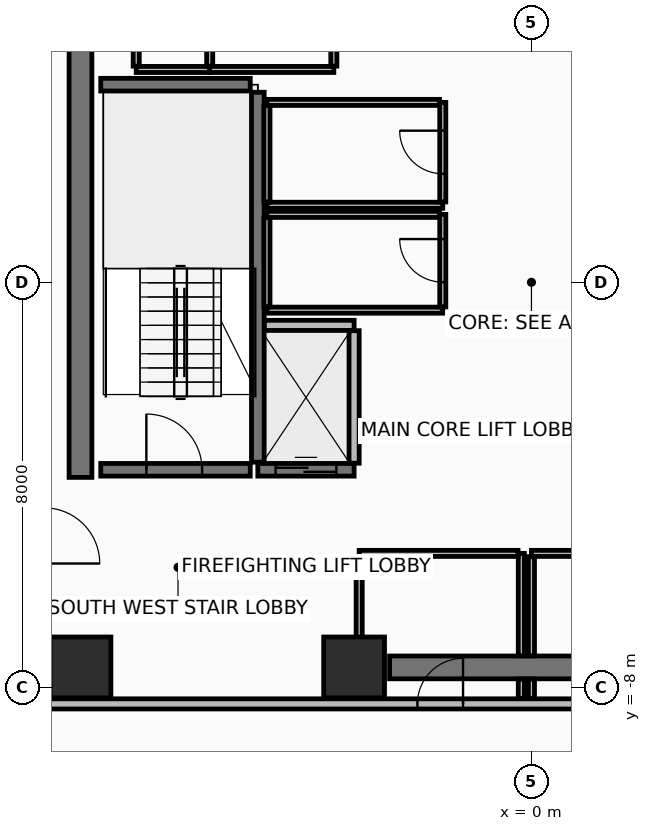
"""IFC4 building model, lengths in metres.
Left out: names, types, materials, properties, quantities, classifications, styles, units other than length and angle.
Written with IfcOpenShell. Run it as: python <this file> out.ifc"""

import sys

from ifc_helpers import new_model, si_unit, direction, frame, frame_2d, origin, origin_2d, place, context, subcontext, project, spatial, rectangle, extrude, element, fill, save


model = new_model("IFC4")
c1 = context("Model", 3, precision=1e-05, world=origin(), true_north=direction((0.0, 1.0)))
c2 = subcontext(c1, "Body", "Model", "MODEL_VIEW")
j1 = project(units=[si_unit("LENGTHUNIT", "METRE"), si_unit("PLANEANGLEUNIT", "RADIAN")], contexts=[c1])
p1 = place(None, origin())
s1 = spatial("IfcSite", under=j1, at=p1, CompositionType="ELEMENT")
p2 = place(p1, origin())
s2 = spatial("IfcBuilding", under=s1, at=p2, CompositionType="ELEMENT")
p3 = place(p2, frame((0.0, 0.0, 156.8)))
s3 = spatial("IfcBuildingStorey", under=s2, at=p3, CompositionType="ELEMENT", Elevation=156.8)
for number, where, z_axis, x_axis in (
    (1, (-8.9, -7.6, 0.0), (0.0, 0.0, 1.0), (1.0, 0.0, 0.0)),
    (2, (-3.5, -7.6, 0.0), (0.0, 0.0, 1.0), (1.0, 0.0, 0.0)),
):
    element("IfcColumn", number, at=place(p3, frame(where, z_axis=z_axis, x_axis=x_axis)), inside=s3, PredefinedType="COLUMN", context=c2, shape_type="SweptSolid", body=[
        extrude(rectangle(XDim=1.2, YDim=1.2, at=origin_2d()), origin(), (0.0, 0.0, 1.0), 3.6),
    ])
p4 = place(p3, frame((-2.8, -7.6, 0.0), z_axis=(0.0, 0.0, 1.0), x_axis=(1.0, 0.0, 0.0)))
e3 = element("IfcWall", 3, at=p4, inside=s3, PredefinedType="SHEAR", context=c2, shape_type="SweptSolid", body=[
    extrude(rectangle(XDim=5.38, YDim=0.45, at=frame_2d((2.69, 0.0))), origin(), (0.0, 0.0, 1.0), 3.41),
])
p5 = place(p3, frame((-8.9, -3.85, 0.0), z_axis=(0.0, 0.0, 1.0), x_axis=(0.0, 1.0, 0.0)))
e4 = element("IfcWall", 4, at=p5, inside=s3, PredefinedType="SHEAR", context=c2, shape_type="SweptSolid", body=[
    extrude(rectangle(XDim=10.7, YDim=0.45, at=frame_2d((5.35, 0.0))), origin(), (0.0, 0.0, 1.0), 3.41),
])
p6 = place(p3, frame((-9.62, -8.32, 0.0), z_axis=(0.0, 0.0, 1.0), x_axis=(1.0, 0.0, 0.0)))
e5 = element("IfcWall", 5, at=p6, inside=s3, PredefinedType="PARTITIONING", context=c2, shape_type="SweptSolid", body=[
    extrude(rectangle(XDim=19.24, YDim=0.2, at=frame_2d((9.62, 0.0))), origin(), (0.0, 0.0, 1.0), 2.855),
])
p7 = place(p6, frame((7.37, 0.0, 0.0)))
e6 = element("IfcOpeningElement", 6, at=p7, cuts=e5, PredefinedType="OPENING", context=c2, shape_type="SweptSolid", body=[
    extrude(rectangle(XDim=0.9, YDim=2.1, at=frame_2d((0.45, 1.05))), frame((0.0, 0.11, 0.0), z_axis=(0.0, -1.0, 0.0), x_axis=(1.0, 0.0, 0.0)), (0.0, 0.0, 1.0), 0.22),
])
p8 = place(p6, frame((10.77, 0.0, 0.0)))
e7 = element("IfcOpeningElement", 7, at=p8, cuts=e5, PredefinedType="OPENING", context=c2, shape_type="SweptSolid", body=[
    extrude(rectangle(XDim=0.9, YDim=2.1, at=frame_2d((0.45, 1.05))), frame((0.0, 0.11, 0.0), z_axis=(0.0, -1.0, 0.0), x_axis=(1.0, 0.0, 0.0)), (0.0, 0.0, 1.0), 0.22),
])
p9 = place(p6, frame((13.97, 0.0, 0.0)))
e8 = element("IfcOpeningElement", 8, at=p9, cuts=e5, PredefinedType="OPENING", context=c2, shape_type="SweptSolid", body=[
    extrude(rectangle(XDim=0.9, YDim=2.1, at=frame_2d((0.45, 1.05))), frame((0.0, 0.11, 0.0), z_axis=(0.0, -1.0, 0.0), x_axis=(1.0, 0.0, 0.0)), (0.0, 0.0, 1.0), 0.22),
])
p10 = place(p3, frame((-5.4, -3.55, 0.0), z_axis=(0.0, 0.0, 1.0), x_axis=(0.0, 1.0, 0.0)))
e9 = element("IfcWall", 9, at=p10, inside=s3, PredefinedType="SHEAR", context=c2, shape_type="SweptSolid", body=[
    extrude(rectangle(XDim=7.3, YDim=0.25, at=frame_2d((3.65, 0.0))), origin(), (0.0, 0.0, 1.0), 3.41),
])
p11 = place(p3, frame((-8.5, -3.7, 0.0), z_axis=(0.0, 0.0, 1.0), x_axis=(1.0, 0.0, 0.0)))
e10 = element("IfcWall", 10, at=p11, inside=s3, PredefinedType="SHEAR", context=c2, shape_type="SweptSolid", body=[
    extrude(rectangle(XDim=2.95, YDim=0.25, at=frame_2d((1.475, 0.0))), origin(), (0.0, 0.0, 1.0), 3.41),
])
p12 = place(p11, frame((0.9, 0.0, 0.0)))
e11 = element("IfcOpeningElement", 11, at=p12, cuts=e10, PredefinedType="OPENING", context=c2, shape_type="SweptSolid", body=[
    extrude(rectangle(XDim=1.1, YDim=2.15, at=frame_2d((0.55, 1.075))), frame((0.0, 0.135, 0.0), z_axis=(0.0, -1.0, 0.0), x_axis=(1.0, 0.0, 0.0)), (0.0, 0.0, 1.0), 0.27),
])
p13 = place(p3, frame((-8.5, 3.9, 0.0), z_axis=(0.0, 0.0, 1.0), x_axis=(1.0, 0.0, 0.0)))
e12 = element("IfcWall", 12, at=p13, inside=s3, PredefinedType="SHEAR", context=c2, shape_type="SweptSolid", body=[
    extrude(rectangle(XDim=2.95, YDim=0.25, at=frame_2d((1.475, 0.0))), origin(), (0.0, 0.0, 1.0), 3.41),
])
p14 = place(p3, frame((-5.4, -3.7, 0.0), z_axis=(0.0, 0.0, 1.0), x_axis=(1.0, 0.0, 0.0)))
e13 = element("IfcWall", 13, at=p14, inside=s3, PredefinedType="SHEAR", context=c2, shape_type="SweptSolid", body=[
    extrude(rectangle(XDim=1.9, YDim=0.25, at=frame_2d((0.95, 0.0))), origin(), (0.0, 0.0, 1.0), 3.41),
])
p15 = place(p14, frame((0.35, 0.0, 0.0)))
e14 = element("IfcOpeningElement", 14, at=p15, cuts=e13, PredefinedType="OPENING", context=c2, shape_type="SweptSolid", body=[
    extrude(rectangle(XDim=1.2, YDim=2.2, at=frame_2d((0.6, 1.1))), frame((0.0, 0.135, 0.0), z_axis=(0.0, -1.0, 0.0), x_axis=(1.0, 0.0, 0.0)), (0.0, 0.0, 1.0), 0.27),
])
p16 = place(p3, frame((-5.27, -0.85, 0.0), z_axis=(0.0, 0.0, 1.0), x_axis=(1.0, 0.0, 0.0)))
e15 = element("IfcWall", 15, at=p16, inside=s3, PredefinedType="PARTITIONING", context=c2, shape_type="SweptSolid", body=[
    extrude(rectangle(XDim=1.77, YDim=0.2, at=frame_2d((0.885, 0.0))), origin(), (0.0, 0.0, 1.0), 3.41),
])
p17 = place(p3, frame((-3.5, -3.57, 0.0), z_axis=(0.0, 0.0, 1.0), x_axis=(0.0, 1.0, 0.0)))
e16 = element("IfcWall", 16, at=p17, inside=s3, PredefinedType="PARTITIONING", context=c2, shape_type="SweptSolid", body=[
    extrude(rectangle(XDim=2.615, YDim=0.2, at=frame_2d((1.308, 0.0))), origin(), (0.0, 0.0, 1.0), 3.41),
])
p18 = place(p3, frame((-5.22, 1.52, 0.0), z_axis=(0.0, 0.0, 1.0), x_axis=(1.0, 0.0, 0.0)))
e17 = element("IfcWall", 17, at=p18, inside=s3, PredefinedType="PARTITIONING", context=c2, shape_type="SweptSolid", body=[
    extrude(rectangle(XDim=3.47, YDim=0.12, at=frame_2d((1.735, 0.0))), origin(), (0.0, 0.0, 1.0), 3.41),
])
p19 = place(p3, frame((-1.75, 1.585, 0.0), z_axis=(0.0, 0.0, 1.0), x_axis=(0.0, 1.0, 0.0)))
e18 = element("IfcWall", 18, at=p19, inside=s3, PredefinedType="PARTITIONING", context=c2, shape_type="SweptSolid", body=[
    extrude(rectangle(XDim=1.965, YDim=0.12, at=frame_2d((0.982, 0.0))), origin(), (0.0, 0.0, 1.0), 3.41),
])
p20 = place(p19, frame((0.557, 0.0, 0.0)))
e19 = element("IfcOpeningElement", 19, at=p20, cuts=e18, PredefinedType="OPENING", context=c2, shape_type="SweptSolid", body=[
    extrude(rectangle(XDim=0.85, YDim=2.1, at=frame_2d((0.425, 1.05))), frame((0.0, 0.07, 0.0), z_axis=(0.0, -1.0, 0.0), x_axis=(1.0, 0.0, 0.0)), (0.0, 0.0, 1.0), 0.14),
])
p21 = place(p3, frame((-1.815, 3.55, 0.0), z_axis=(0.0, 0.0, 1.0), x_axis=(-1.0, 0.0, 0.0)))
e20 = element("IfcWall", 20, at=p21, inside=s3, PredefinedType="PARTITIONING", context=c2, shape_type="SweptSolid", body=[
    extrude(rectangle(XDim=3.405, YDim=0.12, at=frame_2d((1.703, 0.0))), origin(), (0.0, 0.0, 1.0), 3.41),
])
p22 = place(p3, frame((-5.22, 3.485, 0.0), z_axis=(0.0, 0.0, 1.0), x_axis=(0.0, -1.0, 0.0)))
e21 = element("IfcWall", 21, at=p22, inside=s3, PredefinedType="PARTITIONING", context=c2, shape_type="SweptSolid", body=[
    extrude(rectangle(XDim=1.9, YDim=0.12, at=frame_2d((0.95, 0.0))), origin(), (0.0, 0.0, 1.0), 3.41),
])
p23 = place(p3, frame((-5.22, -0.55, 0.0), z_axis=(0.0, 0.0, 1.0), x_axis=(1.0, 0.0, 0.0)))
e22 = element("IfcWall", 22, at=p23, inside=s3, PredefinedType="PARTITIONING", context=c2, shape_type="SweptSolid", body=[
    extrude(rectangle(XDim=3.47, YDim=0.12, at=frame_2d((1.735, 0.0))), origin(), (0.0, 0.0, 1.0), 3.41),
])
p24 = place(p3, frame((-1.75, -0.485, 0.0), z_axis=(0.0, 0.0, 1.0), x_axis=(0.0, 1.0, 0.0)))
e23 = element("IfcWall", 23, at=p24, inside=s3, PredefinedType="PARTITIONING", context=c2, shape_type="SweptSolid", body=[
    extrude(rectangle(XDim=1.825, YDim=0.12, at=frame_2d((0.913, 0.0))), origin(), (0.0, 0.0, 1.0), 3.41),
])
p25 = place(p24, frame((0.488, 0.0, 0.0)))
e24 = element("IfcOpeningElement", 24, at=p25, cuts=e23, PredefinedType="OPENING", context=c2, shape_type="SweptSolid", body=[
    extrude(rectangle(XDim=0.85, YDim=2.1, at=frame_2d((0.425, 1.05))), frame((0.0, 0.07, 0.0), z_axis=(0.0, -1.0, 0.0), x_axis=(1.0, 0.0, 0.0)), (0.0, 0.0, 1.0), 0.14),
])
p26 = place(p3, frame((-1.815, 1.34, 0.0), z_axis=(0.0, 0.0, 1.0), x_axis=(-1.0, 0.0, 0.0)))
e25 = element("IfcWall", 25, at=p26, inside=s3, PredefinedType="PARTITIONING", context=c2, shape_type="SweptSolid", body=[
    extrude(rectangle(XDim=3.405, YDim=0.12, at=frame_2d((1.703, 0.0))), origin(), (0.0, 0.0, 1.0), 3.41),
])
p27 = place(p3, frame((-5.22, 1.275, 0.0), z_axis=(0.0, 0.0, 1.0), x_axis=(0.0, -1.0, 0.0)))
e26 = element("IfcWall", 26, at=p27, inside=s3, PredefinedType="PARTITIONING", context=c2, shape_type="SweptSolid", body=[
    extrude(rectangle(XDim=1.76, YDim=0.12, at=frame_2d((0.88, 0.0))), origin(), (0.0, 0.0, 1.0), 3.41),
])
p28 = place(p3, frame((-0.2, -8.215, 0.0), z_axis=(0.0, 0.0, 1.0), x_axis=(0.0, 1.0, 0.0)))
e27 = element("IfcWall", 27, at=p28, inside=s3, PredefinedType="PARTITIONING", context=c2, shape_type="SweptSolid", body=[
    extrude(rectangle(XDim=0.385, YDim=0.12, at=frame_2d((0.192, 0.0))), origin(), (0.0, 0.0, 1.0), 2.605),
])
p29 = place(p3, frame((-0.2, -7.37, 0.0), z_axis=(0.0, 0.0, 1.0), x_axis=(0.0, 1.0, 0.0)))
e28 = element("IfcWall", 28, at=p29, inside=s3, PredefinedType="PARTITIONING", context=c2, shape_type="SweptSolid", body=[
    extrude(rectangle(XDim=2.02, YDim=0.12, at=frame_2d((1.01, 0.0))), origin(), (0.0, 0.0, 1.0), 2.605),
])
p30 = place(p3, frame((-0.265, -5.35, 0.0), z_axis=(0.0, 0.0, 1.0), x_axis=(-1.0, 0.0, 0.0)))
e29 = element("IfcWall", 29, at=p30, inside=s3, PredefinedType="PARTITIONING", context=c2, shape_type="SweptSolid", body=[
    extrude(rectangle(XDim=3.135, YDim=0.12, at=frame_2d((1.567, 0.0))), origin(), (0.0, 0.0, 1.0), 2.605),
])
p31 = place(p3, frame((-3.4, -5.415, 0.0), z_axis=(0.0, 0.0, 1.0), x_axis=(0.0, -1.0, 0.0)))
e30 = element("IfcWall", 30, at=p31, inside=s3, PredefinedType="PARTITIONING", context=c2, shape_type="SweptSolid", body=[
    extrude(rectangle(XDim=2.8, YDim=0.12, at=frame_2d((1.4, 0.0))), origin(), (0.0, 0.0, 1.0), 2.605),
])
p32 = place(p3, frame((3.135, -5.35, 0.0), z_axis=(0.0, 0.0, 1.0), x_axis=(-1.0, 0.0, 0.0)))
e31 = element("IfcWall", 31, at=p32, inside=s3, PredefinedType="PARTITIONING", context=c2, shape_type="SweptSolid", body=[
    extrude(rectangle(XDim=3.135, YDim=0.12, at=frame_2d((1.567, 0.0))), origin(), (0.0, 0.0, 1.0), 3.41),
])
p33 = place(p3, frame((0.0, -5.415, 0.0), z_axis=(0.0, 0.0, 1.0), x_axis=(0.0, -1.0, 0.0)))
e32 = element("IfcWall", 32, at=p33, inside=s3, PredefinedType="PARTITIONING", context=c2, shape_type="SweptSolid", body=[
    extrude(rectangle(XDim=1.955, YDim=0.12, at=frame_2d((0.978, 0.0))), origin(), (0.0, 0.0, 1.0), 2.605),
])
p34 = place(p3, frame((0.0, -7.83, 0.0), z_axis=(0.0, 0.0, 1.0), x_axis=(0.0, -1.0, 0.0)))
e33 = element("IfcWall", 33, at=p34, inside=s3, PredefinedType="PARTITIONING", context=c2, shape_type="SweptSolid", body=[
    extrude(rectangle(XDim=0.385, YDim=0.12, at=frame_2d((0.192, 0.0))), origin(), (0.0, 0.0, 1.0), 2.605),
])
p35 = place(p3, frame((-7.8, 4.2, 0.0), z_axis=(0.0, 0.0, 1.0), x_axis=(1.0, 0.0, 0.0)))
e34 = element("IfcWall", 34, at=p35, inside=s3, PredefinedType="PARTITIONING", context=c2, shape_type="SweptSolid", body=[
    extrude(rectangle(XDim=1.45, YDim=0.12, at=frame_2d((0.725, 0.0))), origin(), (0.0, 0.0, 1.0), 3.41),
])
for number, where, z_axis, x_axis in (
    (35, (-6.35, 4.265, 0.0), (0.0, 0.0, 1.0), (0.0, 1.0, 0.0)),
    (36, (-7.8, 8.215, 0.0), (0.0, 0.0, 1.0), (0.0, -1.0, 0.0)),
):
    element("IfcWall", number, at=place(p3, frame(where, z_axis=z_axis, x_axis=x_axis)), inside=s3, PredefinedType="PARTITIONING", context=c2, shape_type="SweptSolid", body=[
        extrude(rectangle(XDim=3.95, YDim=0.12, at=frame_2d((1.975, 0.0))), origin(), (0.0, 0.0, 1.0), 2.605),
    ])
p36 = place(p3, frame((-6.35, 4.2, 0.0), z_axis=(0.0, 0.0, 1.0), x_axis=(1.0, 0.0, 0.0)))
e37 = element("IfcWall", 37, at=p36, inside=s3, PredefinedType="PARTITIONING", context=c2, shape_type="SweptSolid", body=[
    extrude(rectangle(XDim=2.45, YDim=0.12, at=frame_2d((1.225, 0.0))), origin(), (0.0, 0.0, 1.0), 3.41),
])
p37 = place(p3, frame((-3.9, 4.265, 0.0), z_axis=(0.0, 0.0, 1.0), x_axis=(0.0, 1.0, 0.0)))
e38 = element("IfcWall", 38, at=p37, inside=s3, PredefinedType="PARTITIONING", context=c2, shape_type="SweptSolid", body=[
    extrude(rectangle(XDim=3.95, YDim=0.12, at=frame_2d((1.975, 0.0))), origin(), (0.0, 0.0, 1.0), 2.605),
])
p38 = place(p12, origin())
e39 = element("IfcDoor", 39, at=p38, inside=s3, OperationType="SINGLE_SWING_LEFT", PredefinedType="DOOR", context=c2, shape_type="SweptSolid", body=[
    extrude(rectangle(XDim=1.1, YDim=2.15, at=frame_2d((0.55, 1.075))), frame((0.0, 0.025, 0.0), z_axis=(0.0, -1.0, 0.0), x_axis=(1.0, 0.0, 0.0)), (0.0, 0.0, 1.0), 0.05),
])
fill(e11, e39)
p39 = place(p15, origin())
e40 = element("IfcDoor", 40, at=p39, inside=s3, OperationType="SLIDING_TO_RIGHT", PredefinedType="DOOR", context=c2, shape_type="SweptSolid", body=[
    extrude(rectangle(XDim=1.2, YDim=2.2, at=frame_2d((0.6, 1.1))), frame((0.0, 0.025, 0.0), z_axis=(0.0, -1.0, 0.0), x_axis=(1.0, 0.0, 0.0)), (0.0, 0.0, 1.0), 0.05),
])
fill(e14, e40)
p40 = place(p20, frame((0.85, 0.0, 0.0), z_axis=(0.0, 0.0, 1.0), x_axis=(-1.0, 0.0, 0.0)))
e41 = element("IfcDoor", 41, at=p40, inside=s3, OperationType="SINGLE_SWING_RIGHT", PredefinedType="DOOR", context=c2, shape_type="SweptSolid", body=[
    extrude(rectangle(XDim=0.85, YDim=2.1, at=frame_2d((0.425, 1.05))), frame((0.0, 0.025, 0.0), z_axis=(0.0, -1.0, 0.0), x_axis=(1.0, 0.0, 0.0)), (0.0, 0.0, 1.0), 0.05),
])
fill(e19, e41)
p41 = place(p25, frame((0.85, 0.0, 0.0), z_axis=(0.0, 0.0, 1.0), x_axis=(-1.0, 0.0, 0.0)))
e42 = element("IfcDoor", 42, at=p41, inside=s3, OperationType="SINGLE_SWING_RIGHT", PredefinedType="DOOR", context=c2, shape_type="SweptSolid", body=[
    extrude(rectangle(XDim=0.85, YDim=2.1, at=frame_2d((0.425, 1.05))), frame((0.0, 0.025, 0.0), z_axis=(0.0, -1.0, 0.0), x_axis=(1.0, 0.0, 0.0)), (0.0, 0.0, 1.0), 0.05),
])
fill(e24, e42)
p42 = place(p7, frame((0.9, 0.0, 0.0), z_axis=(0.0, 0.0, 1.0), x_axis=(-1.0, 0.0, 0.0)))
e43 = element("IfcDoor", 43, at=p42, inside=s3, OperationType="SINGLE_SWING_LEFT", PredefinedType="DOOR", context=c2, shape_type="SweptSolid", body=[
    extrude(rectangle(XDim=0.9, YDim=2.1, at=frame_2d((0.45, 1.05))), frame((0.0, 0.025, 0.0), z_axis=(0.0, -1.0, 0.0), x_axis=(1.0, 0.0, 0.0)), (0.0, 0.0, 1.0), 0.05),
])
fill(e6, e43)
save(model, sys.argv[1])
